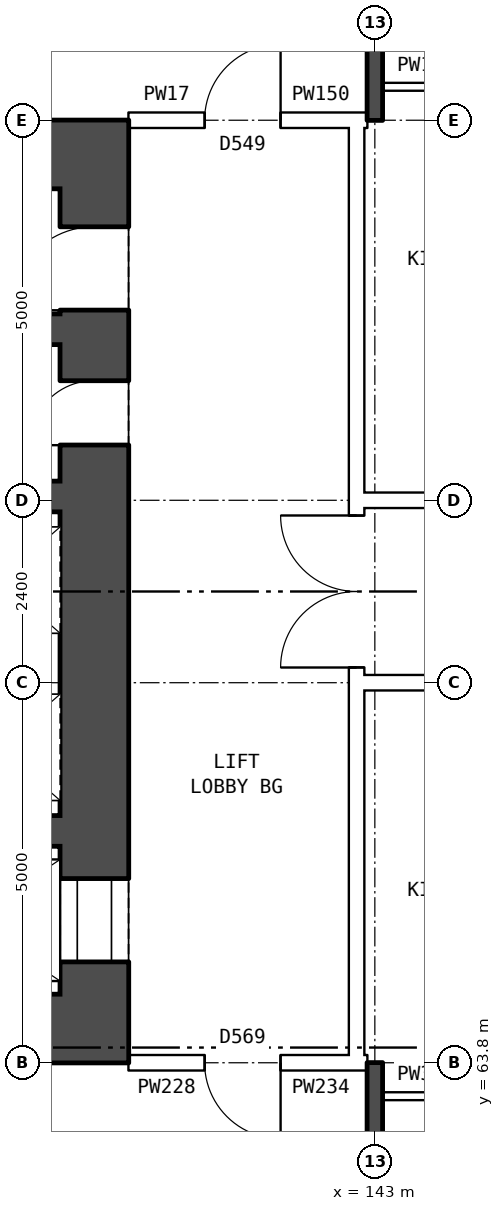
"""IFC4 building model, lengths in metres.
Left out: names, types, materials, properties, quantities, classifications, styles, units other than length and angle.
Written with IfcOpenShell. Run it as: python <this file> out.ifc"""

import sys

from ifc_helpers import new_model, si_unit, direction, frame, frame_2d, origin, place, context, subcontext, project, spatial, rectangle, extrude, element, fill, save


model = new_model("IFC4")
c1 = context("Model", 3, precision=1e-05, world=origin(), true_north=direction((0.0, 1.0)))
c2 = subcontext(c1, "Body", "Model", "MODEL_VIEW")
j1 = project(units=[si_unit("LENGTHUNIT", "METRE"), si_unit("PLANEANGLEUNIT", "RADIAN")], contexts=[c1])
p1 = place(None, origin())
s1 = spatial("IfcSite", under=j1, at=p1, CompositionType="ELEMENT")
p2 = place(p1, origin())
s2 = spatial("IfcBuilding", under=s1, at=p2, CompositionType="ELEMENT")
p3 = place(p2, frame((0.0, 0.0, 31.9)))
s3 = spatial("IfcBuildingStorey", under=s2, at=p3, CompositionType="ELEMENT", Elevation=31.9)
p4 = place(p3, frame((139.31, 64.7, 0.0), z_axis=(0.0, 0.0, 1.0), x_axis=(0.0, 1.0, 0.0)))
e1 = element("IfcWall", 1, at=p4, inside=s3, PredefinedType="SHEAR", context=c2, shape_type="SweptSolid", body=[
    extrude(rectangle(XDim=10.6, YDim=0.9, at=frame_2d((5.3, 0.0))), origin(), (0.0, 0.0, 1.0), 2.85),
])
p5 = place(p4, frame((0.425, 0.0, 0.0)))
e2 = element("IfcOpeningElement", 2, at=p5, cuts=e1, PredefinedType="OPENING", context=c2, shape_type="SweptSolid", body=[
    extrude(rectangle(XDim=1.1, YDim=2.1, at=frame_2d((0.55, 1.05))), frame((0.0, 0.46, 0.0), z_axis=(0.0, -1.0, 0.0), x_axis=(1.0, 0.0, 0.0)), (0.0, 0.0, 1.0), 0.92),
])
p6 = place(p4, frame((9.0, 0.0, 0.0)))
e3 = element("IfcOpeningElement", 3, at=p6, cuts=e1, PredefinedType="OPENING", context=c2, shape_type="SweptSolid", body=[
    extrude(rectangle(XDim=1.1, YDim=2.1, at=frame_2d((0.55, 1.05))), frame((0.0, 0.46, 0.0), z_axis=(0.0, -1.0, 0.0), x_axis=(1.0, 0.0, 0.0)), (0.0, 0.0, 1.0), 0.92),
])
p7 = place(p4, frame((7.225, 0.0, 0.0)))
e4 = element("IfcOpeningElement", 4, at=p7, cuts=e1, PredefinedType="OPENING", context=c2, shape_type="SweptSolid", body=[
    extrude(rectangle(XDim=0.85, YDim=2.1, at=frame_2d((0.425, 1.05))), frame((0.0, 0.46, 0.0), z_axis=(0.0, -1.0, 0.0), x_axis=(1.0, 0.0, 0.0)), (0.0, 0.0, 1.0), 0.92),
])
for number, where, z_axis, x_axis in (
    (5, (139.76, 64.25, 0.0), (0.0, 0.0, 1.0), (-1.0, 0.0, 0.0)),
    (6, (139.76, 75.75, 0.0), (0.0, 0.0, 1.0), (-1.0, 0.0, 0.0)),
):
    element("IfcWall", number, at=place(p3, frame(where, z_axis=z_axis, x_axis=x_axis)), inside=s3, PredefinedType="SHEAR", context=c2, shape_type="SweptSolid", body=[
        extrude(rectangle(XDim=8.4, YDim=0.9, at=frame_2d((4.2, 0.0))), origin(), (0.0, 0.0, 1.0), 2.85),
    ])
p8 = place(p3, frame((138.86, 66.85, 0.0), z_axis=(0.0, 0.0, 1.0), x_axis=(-1.0, 0.0, 0.0)))
e7 = element("IfcWall", 7, at=p8, inside=s3, PredefinedType="SHEAR", context=c2, shape_type="SweptSolid", body=[
    extrude(rectangle(XDim=3.7, YDim=0.4, at=frame_2d((1.85, 0.0))), origin(), (0.0, 0.0, 1.0), 2.85),
])
p9 = place(p3, frame((138.86, 71.25, 0.0), z_axis=(0.0, 0.0, 1.0), x_axis=(-1.0, 0.0, 0.0)))
e8 = element("IfcWall", 8, at=p9, inside=s3, PredefinedType="SHEAR", context=c2, shape_type="SweptSolid", body=[
    extrude(rectangle(XDim=6.6, YDim=0.4, at=frame_2d((3.3, 0.0))), origin(), (0.0, 0.0, 1.0), 2.85),
])
p10 = place(p9, frame((4.25, 0.0, 0.0)))
e9 = element("IfcOpeningElement", 9, at=p10, cuts=e8, PredefinedType="OPENING", context=c2, shape_type="SweptSolid", body=[
    extrude(rectangle(XDim=1.1, YDim=2.1, at=frame_2d((0.55, 1.05))), frame((0.0, 0.21, 0.0), z_axis=(0.0, -1.0, 0.0), x_axis=(1.0, 0.0, 0.0)), (0.0, 0.0, 1.0), 0.42),
])
p11 = place(p9, frame((2.6, 0.0, 0.0)))
e10 = element("IfcOpeningElement", 10, at=p11, cuts=e8, PredefinedType="OPENING", context=c2, shape_type="SweptSolid", body=[
    extrude(rectangle(XDim=0.85, YDim=2.1, at=frame_2d((0.425, 1.05))), frame((0.0, 0.21, 0.0), z_axis=(0.0, -1.0, 0.0), x_axis=(1.0, 0.0, 0.0)), (0.0, 0.0, 1.0), 0.42),
])
p12 = place(p3, frame((138.86, 73.45, 0.0), z_axis=(0.0, 0.0, 1.0), x_axis=(-1.0, 0.0, 0.0)))
e11 = element("IfcWall", 11, at=p12, inside=s3, PredefinedType="SHEAR", context=c2, shape_type="SweptSolid", body=[
    extrude(rectangle(XDim=1.95, YDim=0.4, at=frame_2d((0.975, 0.0))), origin(), (0.0, 0.0, 1.0), 2.85),
])
p13 = place(p3, frame((142.76, 63.9, 0.0), z_axis=(0.0, 0.0, 1.0), x_axis=(0.0, 1.0, 0.0)))
e12 = element("IfcWall", 12, at=p13, inside=s3, PredefinedType="PARTITIONING", context=c2, shape_type="SweptSolid", body=[
    extrude(rectangle(XDim=12.2, YDim=0.2, at=frame_2d((6.1, 0.0))), origin(), (0.0, 0.0, 1.0), 2.85),
])
p14 = place(p13, frame((5.1, 0.0, 0.0)))
e13 = element("IfcOpeningElement", 13, at=p14, cuts=e12, PredefinedType="OPENING", context=c2, shape_type="SweptSolid", body=[
    extrude(rectangle(XDim=2.0, YDim=2.1, at=frame_2d((1.0, 1.05))), frame((0.0, 0.11, 0.0), z_axis=(0.0, -1.0, 0.0), x_axis=(1.0, 0.0, 0.0)), (0.0, 0.0, 1.0), 0.22),
])
p15 = place(p3, frame((143.1, 63.36, 0.0), z_axis=(0.0, 0.0, 1.0), x_axis=(1.0, 0.0, 0.0)))
e14 = element("IfcWall", 14, at=p15, inside=s3, PredefinedType="PARTITIONING", context=c2, shape_type="SweptSolid", body=[
    extrude(rectangle(XDim=2.9, YDim=0.1, at=frame_2d((1.45, 0.0))), origin(), (0.0, 0.0, 1.0), 2.85),
])
p16 = place(p15, frame((1.0, 0.0, 0.0)))
e15 = element("IfcOpeningElement", 15, at=p16, cuts=e14, PredefinedType="OPENING", context=c2, shape_type="SweptSolid", body=[
    extrude(rectangle(XDim=0.9, YDim=2.1, at=frame_2d((0.45, 1.05))), frame((0.0, 0.06, 0.0), z_axis=(0.0, -1.0, 0.0), x_axis=(1.0, 0.0, 0.0)), (0.0, 0.0, 1.0), 0.12),
])
p17 = place(p3, frame((139.76, 63.8, 0.0), z_axis=(0.0, 0.0, 1.0), x_axis=(1.0, 0.0, 0.0)))
e16 = element("IfcWall", 16, at=p17, inside=s3, PredefinedType="PARTITIONING", context=c2, shape_type="SweptSolid", body=[
    extrude(rectangle(XDim=3.0, YDim=0.2, at=frame_2d((1.5, 0.0))), origin(), (0.0, 0.0, 1.0), 2.85),
])
p18 = place(p17, frame((1.0, 0.0, 0.0)))
e17 = element("IfcOpeningElement", 17, at=p18, cuts=e16, PredefinedType="OPENING", context=c2, shape_type="SweptSolid", body=[
    extrude(rectangle(XDim=1.0, YDim=2.1, at=frame_2d((0.5, 1.05))), frame((0.0, 0.11, 0.0), z_axis=(0.0, -1.0, 0.0), x_axis=(1.0, 0.0, 0.0)), (0.0, 0.0, 1.0), 0.22),
])
p19 = place(p3, frame((142.76, 63.8, 0.0), z_axis=(0.0, 0.0, 1.0), x_axis=(1.0, 0.0, 0.0)))
e18 = element("IfcWall", 18, at=p19, inside=s3, PredefinedType="PARTITIONING", context=c2, shape_type="SweptSolid", body=[
    extrude(rectangle(XDim=0.14, YDim=0.2, at=frame_2d((0.07, 0.0))), origin(), (0.0, 0.0, 1.0), 2.85),
])
p20 = place(p3, frame((142.76, 68.8, 0.0), z_axis=(0.0, 0.0, 1.0), x_axis=(1.0, 0.0, 0.0)))
e19 = element("IfcWall", 19, at=p20, inside=s3, PredefinedType="PARTITIONING", context=c2, shape_type="SweptSolid", body=[
    extrude(rectangle(XDim=14.48, YDim=0.2, at=frame_2d((7.24, 0.0))), origin(), (0.0, 0.0, 1.0), 2.85),
])
p21 = place(p20, frame((1.12, 0.0, 0.0)))
e20 = element("IfcOpeningElement", 20, at=p21, cuts=e19, PredefinedType="OPENING", context=c2, shape_type="SweptSolid", body=[
    extrude(rectangle(XDim=1.0, YDim=2.1, at=frame_2d((0.5, 1.05))), frame((0.0, 0.11, 0.0), z_axis=(0.0, -1.0, 0.0), x_axis=(1.0, 0.0, 0.0)), (0.0, 0.0, 1.0), 0.22),
])
p22 = place(p20, frame((7.24, 0.0, 0.0)))
e21 = element("IfcOpeningElement", 21, at=p22, cuts=e19, PredefinedType="OPENING", context=c2, shape_type="SweptSolid", body=[
    extrude(rectangle(XDim=1.0, YDim=2.1, at=frame_2d((0.5, 1.05))), frame((0.0, 0.11, 0.0), z_axis=(0.0, -1.0, 0.0), x_axis=(1.0, 0.0, 0.0)), (0.0, 0.0, 1.0), 0.22),
])
p23 = place(p3, frame((142.76, 71.2, 0.0), z_axis=(0.0, 0.0, 1.0), x_axis=(1.0, 0.0, 0.0)))
e22 = element("IfcWall", 22, at=p23, inside=s3, PredefinedType="PARTITIONING", context=c2, shape_type="SweptSolid", body=[
    extrude(rectangle(XDim=14.48, YDim=0.2, at=frame_2d((7.24, 0.0))), origin(), (0.0, 0.0, 1.0), 2.85),
])
p24 = place(p23, frame((1.12, 0.0, 0.0)))
e23 = element("IfcOpeningElement", 23, at=p24, cuts=e22, PredefinedType="OPENING", context=c2, shape_type="SweptSolid", body=[
    extrude(rectangle(XDim=1.0, YDim=2.1, at=frame_2d((0.5, 1.05))), frame((0.0, 0.11, 0.0), z_axis=(0.0, -1.0, 0.0), x_axis=(1.0, 0.0, 0.0)), (0.0, 0.0, 1.0), 0.22),
])
p25 = place(p23, frame((10.24, 0.0, 0.0)))
e24 = element("IfcOpeningElement", 24, at=p25, cuts=e22, PredefinedType="OPENING", context=c2, shape_type="SweptSolid", body=[
    extrude(rectangle(XDim=1.0, YDim=2.1, at=frame_2d((0.5, 1.05))), frame((0.0, 0.11, 0.0), z_axis=(0.0, -1.0, 0.0), x_axis=(1.0, 0.0, 0.0)), (0.0, 0.0, 1.0), 0.22),
])
p26 = place(p3, frame((139.76, 76.2, 0.0), z_axis=(0.0, 0.0, 1.0), x_axis=(1.0, 0.0, 0.0)))
e25 = element("IfcWall", 25, at=p26, inside=s3, PredefinedType="PARTITIONING", context=c2, shape_type="SweptSolid", body=[
    extrude(rectangle(XDim=3.0, YDim=0.2, at=frame_2d((1.5, 0.0))), origin(), (0.0, 0.0, 1.0), 2.85),
])
p27 = place(p26, frame((1.0, 0.0, 0.0)))
e26 = element("IfcOpeningElement", 26, at=p27, cuts=e25, PredefinedType="OPENING", context=c2, shape_type="SweptSolid", body=[
    extrude(rectangle(XDim=1.0, YDim=2.1, at=frame_2d((0.5, 1.05))), frame((0.0, 0.11, 0.0), z_axis=(0.0, -1.0, 0.0), x_axis=(1.0, 0.0, 0.0)), (0.0, 0.0, 1.0), 0.22),
])
p28 = place(p3, frame((142.76, 76.2, 0.0), z_axis=(0.0, 0.0, 1.0), x_axis=(1.0, 0.0, 0.0)))
e27 = element("IfcWall", 27, at=p28, inside=s3, PredefinedType="PARTITIONING", context=c2, shape_type="SweptSolid", body=[
    extrude(rectangle(XDim=0.14, YDim=0.2, at=frame_2d((0.07, 0.0))), origin(), (0.0, 0.0, 1.0), 2.85),
])
p29 = place(p3, frame((143.1, 76.64, 0.0), z_axis=(0.0, 0.0, 1.0), x_axis=(1.0, 0.0, 0.0)))
e28 = element("IfcWall", 28, at=p29, inside=s3, PredefinedType="PARTITIONING", context=c2, shape_type="SweptSolid", body=[
    extrude(rectangle(XDim=2.9, YDim=0.1, at=frame_2d((1.45, 0.0))), origin(), (0.0, 0.0, 1.0), 2.85),
])
p30 = place(p29, frame((1.0, 0.0, 0.0)))
e29 = element("IfcOpeningElement", 29, at=p30, cuts=e28, PredefinedType="OPENING", context=c2, shape_type="SweptSolid", body=[
    extrude(rectangle(XDim=0.9, YDim=2.1, at=frame_2d((0.45, 1.05))), frame((0.0, 0.06, 0.0), z_axis=(0.0, -1.0, 0.0), x_axis=(1.0, 0.0, 0.0)), (0.0, 0.0, 1.0), 0.12),
])
for number, where, z_axis, x_axis in (
    (30, (143.0, 54.36, 0.0), (0.0, 0.0, 1.0), (0.0, 1.0, 0.0)),
    (31, (143.0, 76.2, 0.0), (0.0, 0.0, 1.0), (0.0, 1.0, 0.0)),
):
    element("IfcWall", number, at=place(p3, frame(where, z_axis=z_axis, x_axis=x_axis)), inside=s3, PredefinedType="SOLIDWALL", context=c2, shape_type="SweptSolid", body=[
        extrude(rectangle(XDim=9.44, YDim=0.2, at=frame_2d((4.72, 0.0))), origin(), (0.0, 0.0, 1.0), 2.85),
    ])
p31 = place(p5, origin())
e32 = element("IfcDoor", 32, at=p31, inside=s3, OperationType="DOUBLE_DOOR_SLIDING", PredefinedType="DOOR", context=c2, shape_type="SweptSolid", body=[
    extrude(rectangle(XDim=1.1, YDim=2.1, at=frame_2d((0.55, 1.05))), frame((0.0, 0.435, 0.0), z_axis=(0.0, -1.0, 0.0), x_axis=(1.0, 0.0, 0.0)), (0.0, 0.0, 1.0), 0.05),
])
fill(e2, e32)
p32 = place(p6, origin())
e33 = element("IfcDoor", 33, at=p32, inside=s3, OperationType="SINGLE_SWING_LEFT", PredefinedType="DOOR", context=c2, shape_type="SweptSolid", body=[
    extrude(rectangle(XDim=1.1, YDim=2.1, at=frame_2d((0.55, 1.05))), frame((0.0, 0.435, 0.0), z_axis=(0.0, -1.0, 0.0), x_axis=(1.0, 0.0, 0.0)), (0.0, 0.0, 1.0), 0.05),
])
fill(e3, e33)
p33 = place(p7, origin())
e34 = element("IfcDoor", 34, at=p33, inside=s3, OperationType="SINGLE_SWING_LEFT", PredefinedType="DOOR", context=c2, shape_type="SweptSolid", body=[
    extrude(rectangle(XDim=0.85, YDim=2.1, at=frame_2d((0.425, 1.05))), frame((0.0, 0.435, 0.0), z_axis=(0.0, -1.0, 0.0), x_axis=(1.0, 0.0, 0.0)), (0.0, 0.0, 1.0), 0.05),
])
fill(e4, e34)
p34 = place(p14, origin())
e35 = element("IfcDoor", 35, at=p34, inside=s3, OperationType="DOUBLE_DOOR_SINGLE_SWING", PredefinedType="DOOR", context=c2, shape_type="SweptSolid", body=[
    extrude(rectangle(XDim=2.0, YDim=2.1, at=frame_2d((1.0, 1.05))), frame((0.0, 0.025, 0.0), z_axis=(0.0, -1.0, 0.0), x_axis=(1.0, 0.0, 0.0)), (0.0, 0.0, 1.0), 0.05),
])
fill(e13, e35)
p35 = place(p18, frame((1.0, 0.0, 0.0), z_axis=(0.0, 0.0, 1.0), x_axis=(-1.0, 0.0, 0.0)))
e36 = element("IfcDoor", 36, at=p35, inside=s3, OperationType="SINGLE_SWING_LEFT", PredefinedType="DOOR", context=c2, shape_type="SweptSolid", body=[
    extrude(rectangle(XDim=1.0, YDim=2.1, at=frame_2d((0.5, 1.05))), frame((0.0, 0.025, 0.0), z_axis=(0.0, -1.0, 0.0), x_axis=(1.0, 0.0, 0.0)), (0.0, 0.0, 1.0), 0.05),
])
fill(e17, e36)
p36 = place(p27, origin())
e37 = element("IfcDoor", 37, at=p36, inside=s3, OperationType="SINGLE_SWING_RIGHT", PredefinedType="DOOR", context=c2, shape_type="SweptSolid", body=[
    extrude(rectangle(XDim=1.0, YDim=2.1, at=frame_2d((0.5, 1.05))), frame((0.0, 0.025, 0.0), z_axis=(0.0, -1.0, 0.0), x_axis=(1.0, 0.0, 0.0)), (0.0, 0.0, 1.0), 0.05),
])
fill(e26, e37)
save(model, sys.argv[1])
